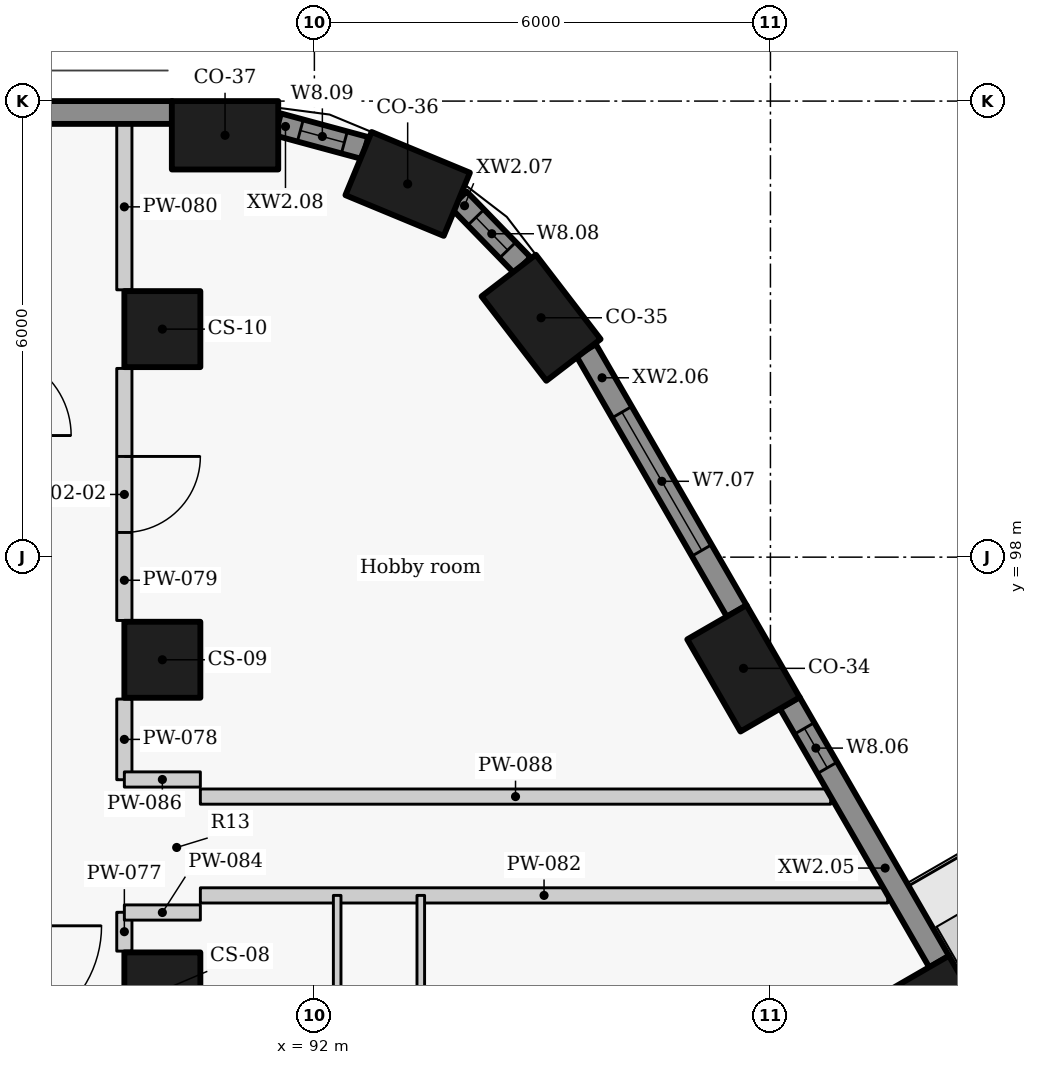
"""IFC4 building model, lengths in metres.
Left out: names, types, materials, properties, quantities, classifications, styles, units other than length and angle.
Written with IfcOpenShell. Run it as: python <this file> out.ifc"""

import sys

from ifc_helpers import new_model, si_unit, direction, frame, frame_2d, origin, origin_2d, place, context, subcontext, project, spatial, rectangle, extrude, element, fill, save


model = new_model("IFC4")
c1 = context("Model", 3, precision=1e-05, world=origin(), true_north=direction((0.0, 1.0)))
c2 = subcontext(c1, "Body", "Model", "MODEL_VIEW")
j1 = project(units=[si_unit("LENGTHUNIT", "METRE"), si_unit("PLANEANGLEUNIT", "RADIAN")], contexts=[c1])
p1 = place(None, origin())
s1 = spatial("IfcSite", under=j1, at=p1, CompositionType="ELEMENT")
p2 = place(p1, origin())
s2 = spatial("IfcBuilding", under=s1, at=p2, CompositionType="ELEMENT")
p3 = place(p2, frame((0.0, 0.0, 81.0)))
s3 = spatial("IfcBuildingStorey", under=s2, at=p3, CompositionType="ELEMENT", Elevation=81.0)
for number, where, z_axis, x_axis in (
    (1, (100.308, 91.925, 0.0), (0.0, 0.0, 1.0), (-0.5, 0.866, 0.0)),
    (2, (97.646, 96.537, 0.0), (0.0, 0.0, 1.0), (-0.5, 0.866, 0.0)),
    (3, (94.982, 101.149, 0.0), (0.0, 0.0, 1.0), (-0.609, 0.793, 0.0)),
    (4, (93.227, 102.91, 0.0), (0.0, 0.0, 1.0), (-0.924, 0.383, 0.0)),
    (5, (90.825, 103.55, 0.0), (0.0, 0.0, 1.0), (-1.0, 0.0, 0.0)),
):
    element("IfcColumn", number, at=place(p3, frame(where, z_axis=z_axis, x_axis=x_axis)), inside=s3, PredefinedType="COLUMN", context=c2, shape_type="SweptSolid", body=[
        extrude(rectangle(XDim=1.4, YDim=0.9, at=origin_2d()), origin(), (0.0, 0.0, 1.0), 3.3),
    ])
for number, where, z_axis, x_axis in (
    (6, (90.0, 92.3, 0.0), (0.0, 0.0, 1.0), (0.0, 1.0, 0.0)),
    (7, (90.0, 96.65, 0.0), (0.0, 0.0, 1.0), (0.0, 1.0, 0.0)),
    (8, (90.0, 101.0, 0.0), (0.0, 0.0, 1.0), (0.0, 1.0, 0.0)),
):
    element("IfcColumn", number, at=place(p3, frame(where, z_axis=z_axis, x_axis=x_axis)), inside=s3, PredefinedType="COLUMN", context=c2, shape_type="SweptSolid", body=[
        extrude(rectangle(XDim=1.0, YDim=1.0, at=origin_2d()), origin(), (0.0, 0.0, 1.0), 3.3),
    ])
p4 = place(p3, frame((100.22, 92.677, 0.0), z_axis=(0.0, 0.0, 1.0), x_axis=(-0.499957037901, 0.866050206543, 0.0)))
e9 = element("IfcWall", 9, at=p4, inside=s3, PredefinedType="SOLIDWALL", context=c2, shape_type="SweptSolid", body=[
    extrude(rectangle(XDim=3.934, YDim=0.3, at=frame_2d((1.967, 0.0))), origin(), (0.0, 0.0, 1.0), 2.425),
])
p5 = place(p4, frame((2.945, 0.0, 0.9)))
e10 = element("IfcOpeningElement", 10, at=p5, cuts=e9, PredefinedType="OPENING", context=c2, shape_type="SweptSolid", body=[
    extrude(rectangle(XDim=0.6, YDim=1.1, at=frame_2d((0.3, 0.55))), frame((0.0, 0.16, 0.0), z_axis=(0.0, -1.0, 0.0), x_axis=(1.0, 0.0, 0.0)), (0.0, 0.0, 1.0), 0.32),
])
p6 = place(p3, frame((97.557, 97.29, 0.0), z_axis=(0.0, 0.0, 1.0), x_axis=(-0.500043828347, 0.866000097998, 0.0)))
e11 = element("IfcWall", 11, at=p6, inside=s3, PredefinedType="SOLIDWALL", context=c2, shape_type="SweptSolid", body=[
    extrude(rectangle(XDim=3.968, YDim=0.3, at=frame_2d((1.984, 0.0))), origin(), (0.0, 0.0, 1.0), 2.425),
])
p7 = place(p6, frame((0.922, 0.0, 0.9)))
e12 = element("IfcOpeningElement", 12, at=p7, cuts=e11, PredefinedType="OPENING", context=c2, shape_type="SweptSolid", body=[
    extrude(rectangle(XDim=2.1, YDim=1.1, at=frame_2d((1.05, 0.55))), frame((0.0, 0.16, 0.0), z_axis=(0.0, -1.0, 0.0), x_axis=(1.0, 0.0, 0.0)), (0.0, 0.0, 1.0), 0.32),
])
p8 = place(p3, frame((94.738, 101.839, 0.0), z_axis=(0.0, 0.0, 1.0), x_axis=(-0.697032216592, 0.717039809936, 0.0)))
e13 = element("IfcWall", 13, at=p8, inside=s3, PredefinedType="SOLIDWALL", context=c2, shape_type="SweptSolid", body=[
    extrude(rectangle(XDim=1.208, YDim=0.3, at=frame_2d((0.604, 0.0))), origin(), (0.0, 0.0, 1.0), 2.425),
])
p9 = place(p8, frame((0.279, 0.0, 0.9)))
e14 = element("IfcOpeningElement", 14, at=p9, cuts=e13, PredefinedType="OPENING", context=c2, shape_type="SweptSolid", body=[
    extrude(rectangle(XDim=0.6, YDim=1.1, at=frame_2d((0.3, 0.55))), frame((0.0, 0.16, 0.0), z_axis=(0.0, -1.0, 0.0), x_axis=(1.0, 0.0, 0.0)), (0.0, 0.0, 1.0), 0.32),
])
p10 = place(p3, frame((92.669, 103.382, 0.0), z_axis=(0.0, 0.0, 1.0), x_axis=(-0.965278131029, 0.261224290136, 0.0)))
e15 = element("IfcWall", 15, at=p10, inside=s3, PredefinedType="SOLIDWALL", context=c2, shape_type="SweptSolid", body=[
    extrude(rectangle(XDim=1.19, YDim=0.3, at=frame_2d((0.595, 0.0))), origin(), (0.0, 0.0, 1.0), 2.425),
])
p11 = place(p10, frame((0.285, 0.0, 0.9)))
e16 = element("IfcOpeningElement", 16, at=p11, cuts=e15, PredefinedType="OPENING", context=c2, shape_type="SweptSolid", body=[
    extrude(rectangle(XDim=0.6, YDim=1.1, at=frame_2d((0.3, 0.55))), frame((0.0, 0.16, 0.0), z_axis=(0.0, -1.0, 0.0), x_axis=(1.0, 0.0, 0.0)), (0.0, 0.0, 1.0), 0.32),
])
p12 = place(p3, frame((90.129, 103.85, 0.0), z_axis=(0.0, 0.0, 1.0), x_axis=(-1.0, 0.0, 0.0)))
e17 = element("IfcWall", 17, at=p12, inside=s3, PredefinedType="SOLIDWALL", context=c2, shape_type="SweptSolid", body=[
    extrude(rectangle(XDim=20.291, YDim=0.3, at=frame_2d((10.146, 0.0))), origin(), (0.0, 0.0, 1.0), 2.425),
])
p13 = place(p3, frame((89.5, 92.817, 0.0), z_axis=(0.0, 0.0, 1.0), x_axis=(0.0, 1.0, 0.0)))
e18 = element("IfcWall", 18, at=p13, inside=s3, PredefinedType="PARTITIONING", context=c2, shape_type="SweptSolid", body=[
    extrude(rectangle(XDim=0.511, YDim=0.2, at=frame_2d((0.255, 0.0))), origin(), (0.0, 0.0, 1.0), 3.025),
])
p14 = place(p3, frame((89.5, 95.072, 0.0), z_axis=(0.0, 0.0, 1.0), x_axis=(0.0, 1.0, 0.0)))
e19 = element("IfcWall", 19, at=p14, inside=s3, PredefinedType="PARTITIONING", context=c2, shape_type="SweptSolid", body=[
    extrude(rectangle(XDim=1.061, YDim=0.2, at=frame_2d((0.531, 0.0))), origin(), (0.0, 0.0, 1.0), 3.025),
])
p15 = place(p3, frame((89.5, 100.483, 0.0), z_axis=(0.0, 0.0, 1.0), x_axis=(0.0, -1.0, 0.0)))
e20 = element("IfcWall", 20, at=p15, inside=s3, PredefinedType="PARTITIONING", context=c2, shape_type="SweptSolid", body=[
    extrude(rectangle(XDim=3.316, YDim=0.2, at=frame_2d((1.658, 0.0))), origin(), (0.0, 0.0, 1.0), 3.025),
])
p16 = place(p15, frame((1.158, 0.0, 0.0)))
e21 = element("IfcOpeningElement", 21, at=p16, cuts=e20, PredefinedType="OPENING", context=c2, shape_type="SweptSolid", body=[
    extrude(rectangle(XDim=1.0, YDim=2.1, at=frame_2d((0.5, 1.05))), frame((0.0, 0.11, 0.0), z_axis=(0.0, -1.0, 0.0), x_axis=(1.0, 0.0, 0.0)), (0.0, 0.0, 1.0), 0.22),
])
p17 = place(p3, frame((89.5, 101.517, 0.0), z_axis=(0.0, 0.0, 1.0), x_axis=(0.0, 1.0, 0.0)))
e22 = element("IfcWall", 22, at=p17, inside=s3, PredefinedType="PARTITIONING", context=c2, shape_type="SweptSolid", body=[
    extrude(rectangle(XDim=2.183, YDim=0.2, at=frame_2d((1.091, 0.0))), origin(), (0.0, 0.0, 1.0), 3.025),
])
p18 = place(p3, frame((90.5, 93.55, 0.0), z_axis=(0.0, 0.0, 1.0), x_axis=(1.0, 0.0, 0.0)))
e23 = element("IfcWall", 23, at=p18, inside=s3, PredefinedType="PARTITIONING", context=c2, shape_type="SweptSolid", body=[
    extrude(rectangle(XDim=9.043, YDim=0.2, at=frame_2d((4.521, 0.0))), origin(), (0.0, 0.0, 1.0), 2.405),
])
for number, where, z_axis, x_axis in (
    (24, (89.5, 93.325, 0.0), (0.0, 0.0, 1.0), (1.0, 0.0, 0.0)),
    (25, (89.5, 95.075, 0.0), (0.0, 0.0, 1.0), (1.0, 0.0, 0.0)),
):
    element("IfcWall", number, at=place(p3, frame(where, z_axis=z_axis, x_axis=x_axis)), inside=s3, PredefinedType="PARTITIONING", context=c2, shape_type="SweptSolid", body=[
        extrude(rectangle(XDim=1.0, YDim=0.2, at=frame_2d((0.5, 0.0))), origin(), (0.0, 0.0, 1.0), 2.505),
    ])
p19 = place(p3, frame((90.5, 94.85, 0.0), z_axis=(0.0, 0.0, 1.0), x_axis=(1.0, 0.0, 0.0)))
e26 = element("IfcWall", 26, at=p19, inside=s3, PredefinedType="PARTITIONING", context=c2, shape_type="SweptSolid", body=[
    extrude(rectangle(XDim=8.293, YDim=0.2, at=frame_2d((4.146, 0.0))), origin(), (0.0, 0.0, 1.0), 2.405),
])
p20 = place(p3, frame((92.3, 85.1, 0.0), z_axis=(0.0, 0.0, 1.0), x_axis=(0.0, 1.0, 0.0)))
e27 = element("IfcWall", 27, at=p20, inside=s3, PredefinedType="PARTITIONING", context=c2, shape_type="SweptSolid", body=[
    extrude(rectangle(XDim=8.45, YDim=0.1, at=frame_2d((4.225, 0.0))), origin(), (0.0, 0.0, 1.0), 3.025),
])
p21 = place(p20, frame((1.495, 0.0, 0.0)))
e28 = element("IfcOpeningElement", 28, at=p21, cuts=e27, PredefinedType="OPENING", context=c2, shape_type="SweptSolid", body=[
    extrude(rectangle(XDim=0.85, YDim=2.1, at=frame_2d((0.425, 1.05))), frame((0.0, 0.06, 0.0), z_axis=(0.0, -1.0, 0.0), x_axis=(1.0, 0.0, 0.0)), (0.0, 0.0, 1.0), 0.12),
])
p22 = place(p20, frame((5.695, 0.0, 0.0)))
e29 = element("IfcOpeningElement", 29, at=p22, cuts=e27, PredefinedType="OPENING", context=c2, shape_type="SweptSolid", body=[
    extrude(rectangle(XDim=0.9, YDim=2.1, at=frame_2d((0.45, 1.05))), frame((0.0, 0.06, 0.0), z_axis=(0.0, -1.0, 0.0), x_axis=(1.0, 0.0, 0.0)), (0.0, 0.0, 1.0), 0.12),
])
p23 = place(p3, frame((93.4, 93.55, 0.0), z_axis=(0.0, 0.0, 1.0), x_axis=(0.0, -1.0, 0.0)))
e30 = element("IfcWall", 30, at=p23, inside=s3, PredefinedType="PARTITIONING", context=c2, shape_type="SweptSolid", body=[
    extrude(rectangle(XDim=20.55, YDim=0.1, at=frame_2d((10.275, 0.0))), origin(), (0.0, 0.0, 1.0), 3.025),
])
p24 = place(p23, frame((17.898, 0.0, 0.0)))
e31 = element("IfcOpeningElement", 31, at=p24, cuts=e30, PredefinedType="OPENING", context=c2, shape_type="SweptSolid", body=[
    extrude(rectangle(XDim=0.9, YDim=2.1, at=frame_2d((0.45, 1.05))), frame((0.0, 0.06, 0.0), z_axis=(0.0, -1.0, 0.0), x_axis=(1.0, 0.0, 0.0)), (0.0, 0.0, 1.0), 0.12),
])
p25 = place(p23, frame((14.173, 0.0, 0.0)))
e32 = element("IfcOpeningElement", 32, at=p25, cuts=e30, PredefinedType="OPENING", context=c2, shape_type="SweptSolid", body=[
    extrude(rectangle(XDim=0.9, YDim=2.1, at=frame_2d((0.45, 1.05))), frame((0.0, 0.06, 0.0), z_axis=(0.0, -1.0, 0.0), x_axis=(1.0, 0.0, 0.0)), (0.0, 0.0, 1.0), 0.12),
])
p26 = place(p23, frame((11.124, 0.0, 0.0)))
e33 = element("IfcOpeningElement", 33, at=p26, cuts=e30, PredefinedType="OPENING", context=c2, shape_type="SweptSolid", body=[
    extrude(rectangle(XDim=0.9, YDim=2.1, at=frame_2d((0.45, 1.05))), frame((0.0, 0.06, 0.0), z_axis=(0.0, -1.0, 0.0), x_axis=(1.0, 0.0, 0.0)), (0.0, 0.0, 1.0), 0.12),
])
p27 = place(p23, frame((8.141, 0.0, 0.0)))
e34 = element("IfcOpeningElement", 34, at=p27, cuts=e30, PredefinedType="OPENING", context=c2, shape_type="SweptSolid", body=[
    extrude(rectangle(XDim=0.9, YDim=2.1, at=frame_2d((0.45, 1.05))), frame((0.0, 0.06, 0.0), z_axis=(0.0, -1.0, 0.0), x_axis=(1.0, 0.0, 0.0)), (0.0, 0.0, 1.0), 0.12),
])
p28 = place(p23, frame((5.223, 0.0, 0.0)))
e35 = element("IfcOpeningElement", 35, at=p28, cuts=e30, PredefinedType="OPENING", context=c2, shape_type="SweptSolid", body=[
    extrude(rectangle(XDim=0.9, YDim=2.1, at=frame_2d((0.45, 1.05))), frame((0.0, 0.06, 0.0), z_axis=(0.0, -1.0, 0.0), x_axis=(1.0, 0.0, 0.0)), (0.0, 0.0, 1.0), 0.12),
])
p29 = place(p23, frame((1.657, 0.0, 0.0)))
e36 = element("IfcOpeningElement", 36, at=p29, cuts=e30, PredefinedType="OPENING", context=c2, shape_type="SweptSolid", body=[
    extrude(rectangle(XDim=0.9, YDim=2.1, at=frame_2d((0.45, 1.05))), frame((0.0, 0.06, 0.0), z_axis=(0.0, -1.0, 0.0), x_axis=(1.0, 0.0, 0.0)), (0.0, 0.0, 1.0), 0.12),
])
p30 = place(p5, origin())
e37 = element("IfcWindow", 37, at=p30, inside=s3, PartitioningType="SINGLE_PANEL", PredefinedType="WINDOW", context=c2, shape_type="SweptSolid", body=[
    extrude(rectangle(XDim=0.6, YDim=1.1, at=frame_2d((0.3, 0.55))), frame((0.0, 0.03, 0.0), z_axis=(0.0, -1.0, 0.0), x_axis=(1.0, 0.0, 0.0)), (0.0, 0.0, 1.0), 0.06),
])
fill(e10, e37)
p31 = place(p7, origin())
e38 = element("IfcWindow", 38, at=p31, inside=s3, PartitioningType="SINGLE_PANEL", PredefinedType="WINDOW", context=c2, shape_type="SweptSolid", body=[
    extrude(rectangle(XDim=2.1, YDim=1.1, at=frame_2d((1.05, 0.55))), frame((0.0, 0.03, 0.0), z_axis=(0.0, -1.0, 0.0), x_axis=(1.0, 0.0, 0.0)), (0.0, 0.0, 1.0), 0.06),
])
fill(e12, e38)
p32 = place(p9, origin())
e39 = element("IfcWindow", 39, at=p32, inside=s3, PartitioningType="SINGLE_PANEL", PredefinedType="WINDOW", context=c2, shape_type="SweptSolid", body=[
    extrude(rectangle(XDim=0.6, YDim=1.1, at=frame_2d((0.3, 0.55))), frame((0.0, 0.03, 0.0), z_axis=(0.0, -1.0, 0.0), x_axis=(1.0, 0.0, 0.0)), (0.0, 0.0, 1.0), 0.06),
])
fill(e14, e39)
p33 = place(p11, origin())
e40 = element("IfcWindow", 40, at=p33, inside=s3, PartitioningType="SINGLE_PANEL", PredefinedType="WINDOW", context=c2, shape_type="SweptSolid", body=[
    extrude(rectangle(XDim=0.6, YDim=1.1, at=frame_2d((0.3, 0.55))), frame((0.0, 0.03, 0.0), z_axis=(0.0, -1.0, 0.0), x_axis=(1.0, 0.0, 0.0)), (0.0, 0.0, 1.0), 0.06),
])
fill(e16, e40)
p34 = place(p16, origin())
e41 = element("IfcDoor", 41, at=p34, inside=s3, OperationType="SINGLE_SWING_LEFT", PredefinedType="DOOR", context=c2, shape_type="SweptSolid", body=[
    extrude(rectangle(XDim=1.0, YDim=2.1, at=frame_2d((0.5, 1.05))), frame((0.0, 0.025, 0.0), z_axis=(0.0, -1.0, 0.0), x_axis=(1.0, 0.0, 0.0)), (0.0, 0.0, 1.0), 0.05),
])
fill(e21, e41)
save(model, sys.argv[1])
